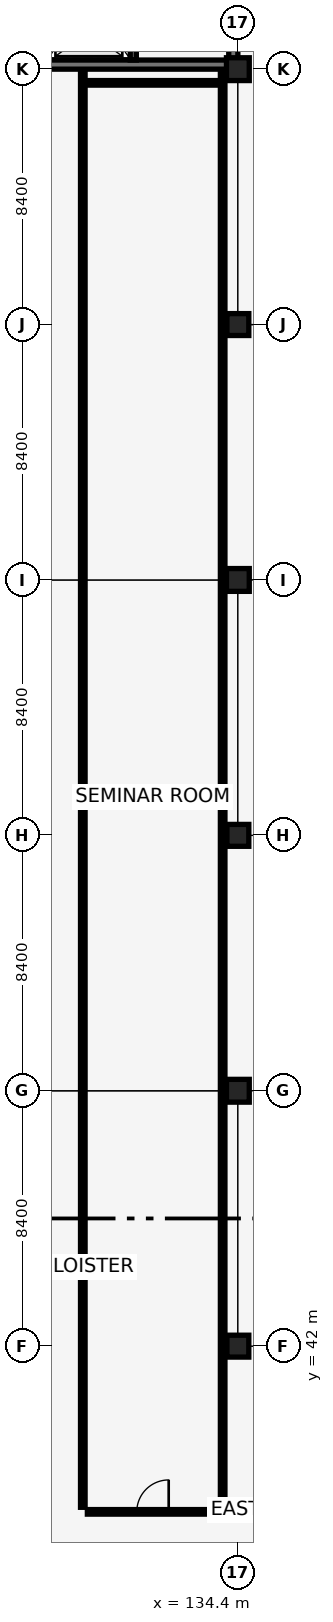
"""IFC4 building model, lengths in metres.
Left out: names, types, materials, properties, quantities, classifications, styles, units other than length and angle.
Written with IfcOpenShell. Run it as: python <this file> out.ifc"""

import sys

from ifc_helpers import new_model, si_unit, direction, frame, frame_2d, origin, origin_2d, place, context, subcontext, project, spatial, rectangle, extrude, element, fill, save


model = new_model("IFC4")
c1 = context("Model", 3, precision=1e-05, world=origin(), true_north=direction((0.0, 1.0)))
c2 = subcontext(c1, "Body", "Model", "MODEL_VIEW")
j1 = project(units=[si_unit("LENGTHUNIT", "METRE"), si_unit("PLANEANGLEUNIT", "RADIAN")], contexts=[c1])
p1 = place(None, origin())
s1 = spatial("IfcSite", under=j1, at=p1, CompositionType="ELEMENT")
p2 = place(p1, origin())
s2 = spatial("IfcBuilding", under=s1, at=p2, CompositionType="ELEMENT")
p3 = place(p2, frame((0.0, 0.0, 5.44)))
s3 = spatial("IfcBuildingStorey", under=s2, at=p3, CompositionType="ELEMENT", Elevation=5.44)
p4 = place(p3, frame((126.15, 84.15, 0.0), z_axis=(0.0, 0.0, 1.0), x_axis=(1.0, 0.0, 0.0)))
e1 = element("IfcWall", 1, at=p4, inside=s3, PredefinedType="SHEAR", context=c2, shape_type="SweptSolid", body=[
    extrude(rectangle(XDim=8.1, YDim=0.3, at=frame_2d((4.05, 0.0))), origin(), (0.0, 0.0, 1.0), 4.12),
])
p5 = place(p4, frame((0.485, 0.0, 0.0)))
e2 = element("IfcOpeningElement", 2, at=p5, cuts=e1, PredefinedType="OPENING", context=c2, shape_type="SweptSolid", body=[
    extrude(rectangle(XDim=1.0, YDim=2.15, at=frame_2d((0.5, 1.075))), frame((0.0, 0.16, 0.0), z_axis=(0.0, -1.0, 0.0), x_axis=(1.0, 0.0, 0.0)), (0.0, 0.0, 1.0), 0.32),
])
p6 = place(p3, frame((134.25, 84.15, 0.0), z_axis=(0.0, 0.0, 1.0), x_axis=(0.0, 1.0, 0.0)))
e3 = element("IfcWall", 3, at=p6, inside=s3, PredefinedType="SHEAR", context=c2, shape_type="SweptSolid", body=[
    extrude(rectangle(XDim=8.1, YDim=0.3, at=frame_2d((4.05, 0.0))), origin(), (0.0, 0.0, 1.0), 4.12),
])
p7 = place(p6, frame((1.325, 0.0, 0.0)))
e4 = element("IfcOpeningElement", 4, at=p7, cuts=e3, PredefinedType="OPENING", context=c2, shape_type="SweptSolid", body=[
    extrude(rectangle(XDim=1.45, YDim=2.15, at=frame_2d((0.725, 1.075))), frame((0.0, 0.16, 0.0), z_axis=(0.0, -1.0, 0.0), x_axis=(1.0, 0.0, 0.0)), (0.0, 0.0, 1.0), 0.32),
])
p8 = place(p3, frame((134.4, 42.0, 0.0), z_axis=(0.0, 0.0, 1.0), x_axis=(1.0, 0.0, 0.0)))
e5 = element("IfcColumn", 5, at=p8, inside=s3, PredefinedType="COLUMN", context=c2, shape_type="SweptSolid", body=[
    extrude(rectangle(XDim=0.72, YDim=0.72, at=origin_2d()), origin(), (0.0, 0.0, 1.0), 4.12),
])
p9 = place(p3, frame((134.4, 50.4, 0.0), z_axis=(0.0, 0.0, 1.0), x_axis=(1.0, 0.0, 0.0)))
e6 = element("IfcColumn", 6, at=p9, inside=s3, PredefinedType="COLUMN", context=c2, shape_type="SweptSolid", body=[
    extrude(rectangle(XDim=0.75, YDim=0.75, at=origin_2d()), origin(), (0.0, 0.0, 1.0), 4.12),
])
p10 = place(p3, frame((134.4, 58.8, 0.0), z_axis=(0.0, 0.0, 1.0), x_axis=(1.0, 0.0, 0.0)))
e7 = element("IfcColumn", 7, at=p10, inside=s3, PredefinedType="COLUMN", context=c2, shape_type="SweptSolid", body=[
    extrude(rectangle(XDim=0.72, YDim=0.72, at=origin_2d()), origin(), (0.0, 0.0, 1.0), 4.12),
])
p11 = place(p3, frame((134.4, 67.2, 0.0), z_axis=(0.0, 0.0, 1.0), x_axis=(1.0, 0.0, 0.0)))
e8 = element("IfcColumn", 8, at=p11, inside=s3, PredefinedType="COLUMN", context=c2, shape_type="SweptSolid", body=[
    extrude(rectangle(XDim=0.75, YDim=0.75, at=origin_2d()), origin(), (0.0, 0.0, 1.0), 4.12),
])
p12 = place(p3, frame((134.4, 75.6, 0.0), z_axis=(0.0, 0.0, 1.0), x_axis=(1.0, 0.0, 0.0)))
e9 = element("IfcColumn", 9, at=p12, inside=s3, PredefinedType="COLUMN", context=c2, shape_type="SweptSolid", body=[
    extrude(rectangle(XDim=0.72, YDim=0.72, at=origin_2d()), origin(), (0.0, 0.0, 1.0), 4.12),
])
p13 = place(p3, frame((134.4, 84.0, 0.0), z_axis=(0.0, 0.0, 1.0), x_axis=(1.0, 0.0, 0.0)))
e10 = element("IfcColumn", 10, at=p13, inside=s3, PredefinedType="COLUMN", context=c2, shape_type="SweptSolid", body=[
    extrude(rectangle(XDim=0.75, YDim=0.75, at=origin_2d()), origin(), (0.0, 0.0, 1.0), 4.12),
])
p14 = place(p3, frame((130.96, 84.3, 0.0), z_axis=(0.0, 0.0, 1.0), x_axis=(0.0, 1.0, 0.0)))
e11 = element("IfcWall", 11, at=p14, inside=s3, PredefinedType="SHEAR", context=c2, shape_type="SweptSolid", body=[
    extrude(rectangle(XDim=3.8, YDim=0.2, at=frame_2d((1.9, 0.0))), origin(), (0.0, 0.0, 1.0), 3.34),
])
p15 = place(p14, frame((0.375, 0.0, 0.0)))
e12 = element("IfcOpeningElement", 12, at=p15, cuts=e11, PredefinedType="OPENING", context=c2, shape_type="SweptSolid", body=[
    extrude(rectangle(XDim=1.1, YDim=2.15, at=frame_2d((0.55, 1.075))), frame((0.0, 0.11, 0.0), z_axis=(0.0, -1.0, 0.0), x_axis=(1.0, 0.0, 0.0)), (0.0, 0.0, 1.0), 0.22),
])
p16 = place(p14, frame((2.175, 0.0, 0.0)))
e13 = element("IfcOpeningElement", 13, at=p16, cuts=e11, PredefinedType="OPENING", context=c2, shape_type="SweptSolid", body=[
    extrude(rectangle(XDim=1.4, YDim=2.2, at=frame_2d((0.7, 1.1))), frame((0.0, 0.11, 0.0), z_axis=(0.0, -1.0, 0.0), x_axis=(1.0, 0.0, 0.0)), (0.0, 0.0, 1.0), 0.22),
])
p17 = place(p3, frame((129.45, 36.55, 0.0), z_axis=(0.0, 0.0, 1.0), x_axis=(1.0, 0.0, 0.0)))
e14 = element("IfcWall", 14, at=p17, inside=s3, PredefinedType="PARTITIONING", context=c2, shape_type="SweptSolid", body=[
    extrude(rectangle(XDim=4.3, YDim=0.15, at=frame_2d((2.15, 0.0))), origin(), (0.0, 0.0, 1.0), 4.12),
])
p18 = place(p17, frame((1.625, 0.0, 0.0)))
e15 = element("IfcOpeningElement", 15, at=p18, cuts=e14, PredefinedType="OPENING", context=c2, shape_type="SweptSolid", body=[
    extrude(rectangle(XDim=1.05, YDim=2.15, at=frame_2d((0.525, 1.075))), frame((0.0, 0.085, 0.0), z_axis=(0.0, -1.0, 0.0), x_axis=(1.0, 0.0, 0.0)), (0.0, 0.0, 1.0), 0.17),
])
p19 = place(p3, frame((129.45, 83.55, 0.0), z_axis=(0.0, 0.0, 1.0), x_axis=(1.0, 0.0, 0.0)))
e16 = element("IfcWall", 16, at=p19, inside=s3, PredefinedType="PARTITIONING", context=c2, shape_type="SweptSolid", body=[
    extrude(rectangle(XDim=4.3, YDim=0.15, at=frame_2d((2.15, 0.0))), origin(), (0.0, 0.0, 1.0), 4.12),
])
for number, where, z_axis, x_axis in (
    (17, (129.3, 36.7, 0.0), (0.0, 0.0, 1.0), (0.0, 1.0, 0.0)),
    (18, (133.9, 36.7, 0.0), (0.0, 0.0, 1.0), (0.0, 1.0, 0.0)),
):
    element("IfcWall", number, at=place(p3, frame(where, z_axis=z_axis, x_axis=x_axis)), inside=s3, PredefinedType="PARTITIONING", context=c2, shape_type="SweptSolid", body=[
        extrude(rectangle(XDim=47.27, YDim=0.15, at=frame_2d((23.635, 0.0))), origin(), (0.0, 0.0, 1.0), 3.34),
    ])
p20 = place(p18, origin())
e19 = element("IfcDoor", 19, at=p20, inside=s3, OperationType="SINGLE_SWING_RIGHT", PredefinedType="DOOR", context=c2, shape_type="SweptSolid", body=[
    extrude(rectangle(XDim=1.05, YDim=2.15, at=frame_2d((0.525, 1.075))), frame((0.0, 0.025, 0.0), z_axis=(0.0, -1.0, 0.0), x_axis=(1.0, 0.0, 0.0)), (0.0, 0.0, 1.0), 0.05),
])
fill(e15, e19)
save(model, sys.argv[1])
